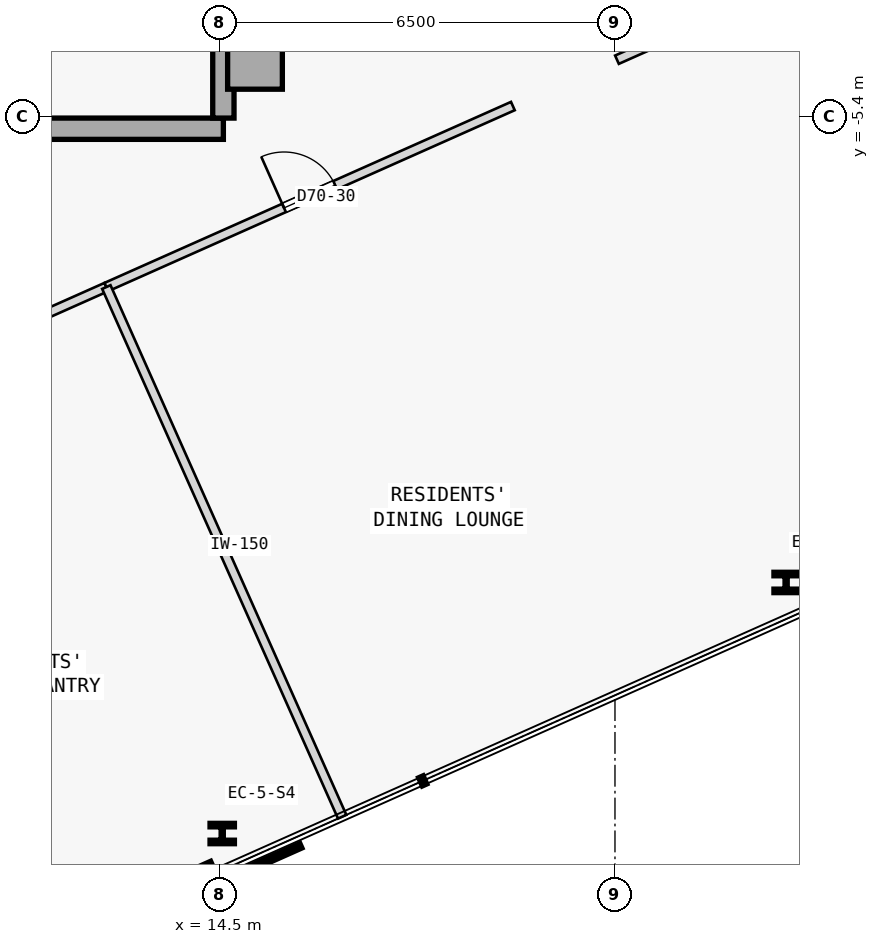
"""IFC4 building model, lengths in metres.
Left out: names, types, materials, properties, quantities, classifications, styles, units other than length and angle.
Written with IfcOpenShell. Run it as: python <this file> out.ifc"""

import sys

from ifc_helpers import new_model, si_unit, direction, frame, frame_2d, origin, origin_2d, place, context, subcontext, project, spatial, rectangle, i_section, extrude, element, fill, save


model = new_model("IFC4")
c1 = context("Model", 3, precision=1e-05, world=origin(), true_north=direction((0.0, 1.0)))
c2 = subcontext(c1, "Body", "Model", "MODEL_VIEW")
j1 = project(units=[si_unit("LENGTHUNIT", "METRE"), si_unit("PLANEANGLEUNIT", "RADIAN")], contexts=[c1])
p1 = place(None, origin())
s1 = spatial("IfcSite", under=j1, at=p1, CompositionType="ELEMENT")
p2 = place(p1, origin())
s2 = spatial("IfcBuilding", under=s1, at=p2, CompositionType="ELEMENT")
p3 = place(p2, frame((0.0, 0.0, 262.2)))
s3 = spatial("IfcBuildingStorey", under=s2, at=p3, CompositionType="ELEMENT", Elevation=262.2)
p4 = place(p3, frame((15.08, -4.5, 0.0), z_axis=(0.0, 0.0, 1.0), x_axis=(1.0, 0.0, 0.0)))
e1 = element("IfcColumn", 1, at=p4, inside=s3, PredefinedType="COLUMN", context=c2, shape_type="SweptSolid", body=[
    extrude(rectangle(XDim=0.9, YDim=0.9, at=origin_2d()), origin(), (0.0, 0.0, 1.0), 3.35),
])
p5 = place(p3, frame((3.7, -5.6, 0.0), z_axis=(0.0, 0.0, 1.0), x_axis=(1.0, 0.0, 0.0)))
e2 = element("IfcWall", 2, at=p5, inside=s3, PredefinedType="SHEAR", context=c2, shape_type="SweptSolid", body=[
    extrude(rectangle(XDim=10.86, YDim=0.35, at=frame_2d((5.43, 0.0))), origin(), (0.0, 0.0, 1.0), 3.125),
])
p6 = place(p3, frame((14.56, -5.425, 0.0), z_axis=(0.0, 0.0, 1.0), x_axis=(0.0, 1.0, 0.0)))
e3 = element("IfcWall", 3, at=p6, inside=s3, PredefinedType="SHEAR", context=c2, shape_type="SweptSolid", body=[
    extrude(rectangle(XDim=10.85, YDim=0.35, at=frame_2d((5.425, 0.0))), origin(), (0.0, 0.0, 1.0), 3.125),
])
for number, where, z_axis, x_axis in (
    (4, (14.541, -17.19, 0.0), (0.0, 0.0, 1.0), (1.0, 0.0, 0.0)),
    (5, (23.814, -13.062, 0.0), (0.0, 0.0, 1.0), (1.0, 0.0, 0.0)),
):
    element("IfcColumn", number, at=place(p3, frame(where, z_axis=z_axis, x_axis=x_axis)), inside=s3, PredefinedType="COLUMN", context=c2, shape_type="SweptSolid", body=[
        extrude(i_section(OverallWidth=0.401, OverallDepth=0.335, WebThickness=0.036, FlangeThickness=0.058, FilletRadius=0.015, at=origin_2d()), origin(), (0.0, 0.0, 1.0), 3.35),
    ])
p7 = place(p3, frame((21.033, -4.465, 0.0), z_axis=(0.0, 0.0, 1.0), x_axis=(0.913543802, 0.40674036169, 0.0)))
e6 = element("IfcWall", 6, at=p7, inside=s3, PredefinedType="PARTITIONING", context=c2, shape_type="SweptSolid", body=[
    extrude(rectangle(XDim=3.65, YDim=0.15, at=frame_2d((1.825, 0.0))), origin(), (0.0, 0.0, 1.0), 3.125),
])
p8 = place(p3, frame((5.672, -11.304, 0.0), z_axis=(0.0, 0.0, 1.0), x_axis=(0.913549829505, 0.40672682357, 0.0)))
e7 = element("IfcWall", 7, at=p8, inside=s3, PredefinedType="PARTITIONING", context=c2, shape_type="SweptSolid", body=[
    extrude(rectangle(XDim=7.622, YDim=0.15, at=frame_2d((3.811, 0.0))), origin(), (0.0, 0.0, 1.0), 3.125),
])
p9 = place(p8, frame((3.351, 0.0, 0.0)))
e8 = element("IfcOpeningElement", 8, at=p9, cuts=e7, PredefinedType="OPENING", context=c2, shape_type="SweptSolid", body=[
    extrude(rectangle(XDim=0.92, YDim=2.15, at=frame_2d((0.46, 1.075))), frame((0.0, 0.085, 0.0), z_axis=(0.0, -1.0, 0.0), x_axis=(1.0, 0.0, 0.0)), (0.0, 0.0, 1.0), 0.17),
])
p10 = place(p3, frame((12.635, -8.204, 0.0), z_axis=(0.0, 0.0, 1.0), x_axis=(0.913541702649, 0.406745076825, 0.0)))
e9 = element("IfcWall", 9, at=p10, inside=s3, PredefinedType="PARTITIONING", context=c2, shape_type="SweptSolid", body=[
    extrude(rectangle(XDim=7.318, YDim=0.15, at=frame_2d((3.659, 0.0))), origin(), (0.0, 0.0, 1.0), 3.125),
])
p11 = place(p10, frame((3.199, 0.0, 0.0)))
e10 = element("IfcOpeningElement", 10, at=p11, cuts=e9, PredefinedType="OPENING", context=c2, shape_type="SweptSolid", body=[
    extrude(rectangle(XDim=0.92, YDim=2.15, at=frame_2d((0.46, 1.075))), frame((0.0, 0.085, 0.0), z_axis=(0.0, -1.0, 0.0), x_axis=(1.0, 0.0, 0.0)), (0.0, 0.0, 1.0), 0.17),
])
p12 = place(p3, frame((16.514, -16.914, 0.0), z_axis=(0.0, 0.0, 1.0), x_axis=(-0.406729927653, 0.913548447512, 0.0)))
e11 = element("IfcWall", 11, at=p12, inside=s3, PredefinedType="PARTITIONING", context=c2, shape_type="SweptSolid", body=[
    extrude(rectangle(XDim=9.535, YDim=0.15, at=frame_2d((4.768, 0.0))), origin(), (0.0, 0.0, 1.0), 3.125),
])
p13 = place(p11, origin())
e12 = element("IfcDoor", 12, at=p13, inside=s3, OperationType="SINGLE_SWING_LEFT", PredefinedType="DOOR", context=c2, shape_type="SweptSolid", body=[
    extrude(rectangle(XDim=0.92, YDim=2.15, at=frame_2d((0.46, 1.075))), frame((0.0, 0.025, 0.0), z_axis=(0.0, -1.0, 0.0), x_axis=(1.0, 0.0, 0.0)), (0.0, 0.0, 1.0), 0.05),
])
fill(e10, e12)
save(model, sys.argv[1])
